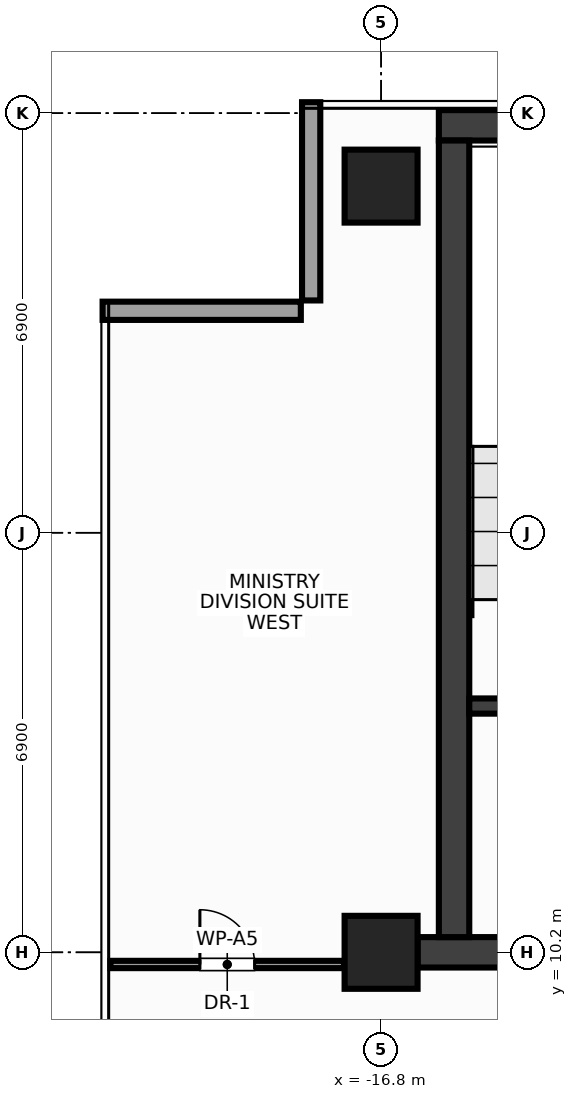
"""IFC4 building model, lengths in metres.
Left out: names, types, materials, properties, quantities, classifications, styles, units other than length and angle.
Written with IfcOpenShell. Run it as: python <this file> out.ifc"""

import sys

from ifc_helpers import new_model, si_unit, direction, frame, frame_2d, origin, origin_2d, place, context, subcontext, project, spatial, rectangle, extrude, source, transform, mapped, element, fill, save


model = new_model("IFC4")
c1 = context("Model", 3, precision=1e-05, world=origin(), true_north=direction((0.0, 1.0)))
c2 = subcontext(c1, "Body", "Model", "MODEL_VIEW")
j1 = project(units=[si_unit("LENGTHUNIT", "METRE"), si_unit("PLANEANGLEUNIT", "RADIAN")], contexts=[c1])
p1 = place(None, origin())
s1 = spatial("IfcSite", under=j1, at=p1, CompositionType="ELEMENT")
p2 = place(p1, origin())
s2 = spatial("IfcBuilding", under=s1, at=p2, CompositionType="ELEMENT")
p3 = place(p2, frame((0.0, 0.0, 275.6)))
s3 = spatial("IfcBuildingStorey", under=s2, at=p3, CompositionType="ELEMENT", Elevation=275.6)
m1 = source(origin(), c2, "Body", "SweptSolid", [
    extrude(rectangle(XDim=31.7, YDim=0.5, at=frame_2d((15.85, 0.0))), origin(), (0.0, 0.0, 1.0), 3.6),
])
p4 = place(p3, frame((-15.85, 23.8, 0.0), z_axis=(0.0, 0.0, 1.0), x_axis=(1.0, 0.0, 0.0)))
e1 = element("IfcWall", 1, at=p4, inside=s3, PredefinedType="SHEAR", context=c2, shape_type="MappedRepresentation", body=[
    mapped(m1, transform((0.0, 0.0, 0.0), x_axis=(1.0, 0.0, 0.0), y_axis=(0.0, 1.0, 0.0), z_axis=(0.0, 0.0, 1.0), scale=1.0)),
])
m2 = source(origin(), c2, "Body", "SweptSolid", [
    extrude(rectangle(XDim=32.4, YDim=0.5, at=frame_2d((16.2, 0.0))), origin(), (0.0, 0.0, 1.0), 3.6),
])
p5 = place(p3, frame((-16.2, 10.2, 0.0), z_axis=(0.0, 0.0, 1.0), x_axis=(1.0, 0.0, 0.0)))
e2 = element("IfcWall", 2, at=p5, inside=s3, PredefinedType="SHEAR", context=c2, shape_type="MappedRepresentation", body=[
    mapped(m2, transform((0.0, 0.0, 0.0), x_axis=(1.0, 0.0, 0.0), y_axis=(0.0, 1.0, 0.0), z_axis=(0.0, 0.0, 1.0), scale=1.0)),
])
p6 = place(p5, frame((2.05, 0.0, 0.0)))
e3 = element("IfcOpeningElement", 3, at=p6, cuts=e2, PredefinedType="OPENING", context=c2, shape_type="SweptSolid", body=[
    extrude(rectangle(XDim=1.6, YDim=2.15, at=frame_2d((0.8, 1.075))), frame((0.0, 0.262, 0.0), z_axis=(0.0, -1.0, 0.0), x_axis=(1.0, 0.0, 0.0)), (0.0, 0.0, 1.0), 0.524),
])
p7 = place(p5, frame((28.75, 0.0, 0.0)))
e4 = element("IfcOpeningElement", 4, at=p7, cuts=e2, PredefinedType="OPENING", context=c2, shape_type="SweptSolid", body=[
    extrude(rectangle(XDim=1.6, YDim=2.15, at=frame_2d((0.8, 1.075))), frame((0.0, 0.262, 0.0), z_axis=(0.0, -1.0, 0.0), x_axis=(1.0, 0.0, 0.0)), (0.0, 0.0, 1.0), 0.524),
])
p8 = place(p5, frame((15.45, 0.0, 0.0)))
e5 = element("IfcOpeningElement", 5, at=p8, cuts=e2, PredefinedType="OPENING", context=c2, shape_type="SweptSolid", body=[
    extrude(rectangle(XDim=1.5, YDim=2.2, at=frame_2d((0.75, 1.1))), frame((0.0, 0.262, 0.0), z_axis=(0.0, -1.0, 0.0), x_axis=(1.0, 0.0, 0.0)), (0.0, 0.0, 1.0), 0.524),
])
m3 = source(origin(), c2, "Body", "SweptSolid", [
    extrude(rectangle(XDim=13.1, YDim=0.5, at=frame_2d((6.55, 0.0))), origin(), (0.0, 0.0, 1.0), 3.6),
])
p9 = place(p3, frame((-15.6, 10.45, 0.0), z_axis=(0.0, 0.0, 1.0), x_axis=(0.0, 1.0, 0.0)))
e6 = element("IfcWall", 6, at=p9, inside=s3, PredefinedType="SHEAR", context=c2, shape_type="MappedRepresentation", body=[
    mapped(m3, transform((0.0, 0.0, 0.0), x_axis=(1.0, 0.0, 0.0), y_axis=(0.0, 1.0, 0.0), z_axis=(0.0, 0.0, 1.0), scale=1.0)),
])
m4 = source(origin(), c2, "Body", "SweptSolid", [
    extrude(rectangle(XDim=3.705, YDim=0.25, at=frame_2d((1.853, 0.0))), origin(), (0.0, 0.0, 1.0), 3.6),
])
p10 = place(p3, frame((-15.35, 14.25, 0.0), z_axis=(0.0, 0.0, 1.0), x_axis=(1.0, 0.0, 0.0)))
e7 = element("IfcWall", 7, at=p10, inside=s3, PredefinedType="SHEAR", context=c2, shape_type="MappedRepresentation", body=[
    mapped(m4, transform((0.0, 0.0, 0.0), x_axis=(1.0, 0.0, 0.0), y_axis=(0.0, 1.0, 0.0), z_axis=(0.0, 0.0, 1.0), scale=1.0)),
])
p11 = place(p10, frame((0.95, 0.0, 0.0)))
e8 = element("IfcOpeningElement", 8, at=p11, cuts=e7, PredefinedType="OPENING", context=c2, shape_type="SweptSolid", body=[
    extrude(rectangle(XDim=1.6, YDim=2.15, at=frame_2d((0.8, 1.075))), frame((0.0, 0.137, 0.0), z_axis=(0.0, -1.0, 0.0), x_axis=(1.0, 0.0, 0.0)), (0.0, 0.0, 1.0), 0.274),
])
m5 = source(origin(), c2, "Body", "SweptSolid", [
    extrude(rectangle(XDim=1.2, YDim=1.2, at=origin_2d()), origin(), (0.0, 0.0, 1.0), 3.6),
])
for number, where, z_axis, x_axis in (
    (9, (-16.8, 10.2, 0.0), (0.0, 0.0, 1.0), (1.0, 0.0, 0.0)),
    (10, (-16.8, 22.8, 0.0), (0.0, 0.0, 1.0), (1.0, 0.0, 0.0)),
):
    element("IfcColumn", number, at=place(p3, frame(where, z_axis=z_axis, x_axis=x_axis)), inside=s3, PredefinedType="COLUMN", context=c2, shape_type="MappedRepresentation", body=[
        mapped(m5, transform((0.0, 0.0, 0.0), x_axis=(1.0, 0.0, 0.0), y_axis=(0.0, 1.0, 0.0), z_axis=(0.0, 0.0, 1.0), scale=1.0)),
    ])
m6 = source(origin(), c2, "Body", "SweptSolid", [
    extrude(rectangle(XDim=3.26, YDim=0.3, at=frame_2d((1.63, 0.0))), origin(), (0.0, 0.0, 1.0), 2.75),
])
p12 = place(p3, frame((-17.95, 24.18, 0.0), z_axis=(0.0, 0.0, 1.0), x_axis=(0.0, -1.0, 0.0)))
e11 = element("IfcWall", 11, at=p12, inside=s3, PredefinedType="STANDARD", context=c2, shape_type="MappedRepresentation", body=[
    mapped(m6, transform((0.0, 0.0, 0.0), x_axis=(1.0, 0.0, 0.0), y_axis=(0.0, 1.0, 0.0), z_axis=(0.0, 0.0, 1.0), scale=1.0)),
])
m7 = source(origin(), c2, "Body", "SweptSolid", [
    extrude(rectangle(XDim=3.26, YDim=0.3, at=frame_2d((1.63, 0.0))), origin(), (0.0, 0.0, 1.0), 2.75),
])
p13 = place(p3, frame((-18.12, 20.75, 0.0), z_axis=(0.0, 0.0, 1.0), x_axis=(-1.0, 0.0, 0.0)))
e12 = element("IfcWall", 12, at=p13, inside=s3, PredefinedType="STANDARD", context=c2, shape_type="MappedRepresentation", body=[
    mapped(m7, transform((0.0, 0.0, 0.0), x_axis=(1.0, 0.0, 0.0), y_axis=(0.0, 1.0, 0.0), z_axis=(0.0, 0.0, 1.0), scale=1.0)),
])
m8 = source(origin(), c2, "Body", "SweptSolid", [
    extrude(rectangle(XDim=3.84, YDim=0.12, at=frame_2d((1.92, 0.0))), origin(), (0.0, 0.0, 1.0), 2.805),
])
p14 = place(p3, frame((-21.25, 10.0, 0.0), z_axis=(0.0, 0.0, 1.0), x_axis=(1.0, 0.0, 0.0)))
e13 = element("IfcWall", 13, at=p14, inside=s3, PredefinedType="PARTITIONING", context=c2, shape_type="MappedRepresentation", body=[
    mapped(m8, transform((0.0, 0.0, 0.0), x_axis=(1.0, 0.0, 0.0), y_axis=(0.0, 1.0, 0.0), z_axis=(0.0, 0.0, 1.0), scale=1.0)),
])
p15 = place(p14, frame((1.47, 0.0, 0.0)))
e14 = element("IfcOpeningElement", 14, at=p15, cuts=e13, PredefinedType="OPENING", context=c2, shape_type="SweptSolid", body=[
    extrude(rectangle(XDim=0.9, YDim=2.15, at=frame_2d((0.45, 1.075))), frame((0.0, 0.072, 0.0), z_axis=(0.0, -1.0, 0.0), x_axis=(1.0, 0.0, 0.0)), (0.0, 0.0, 1.0), 0.144),
])
m9 = source(origin(), c2, "Body", "SweptSolid", [
    extrude(rectangle(XDim=0.9, YDim=2.15, at=frame_2d((0.45, 1.075))), frame((0.0, 0.025, 0.0), z_axis=(0.0, -1.0, 0.0), x_axis=(1.0, 0.0, 0.0)), (0.0, 0.0, 1.0), 0.05),
])
p16 = place(p15, origin())
e15 = element("IfcDoor", 15, at=p16, inside=s3, OperationType="SINGLE_SWING_LEFT", PredefinedType="DOOR", context=c2, shape_type="MappedRepresentation", body=[
    mapped(m9, transform((0.0, 0.0, 0.0), x_axis=(1.0, 0.0, 0.0), y_axis=(0.0, 1.0, 0.0), z_axis=(0.0, 0.0, 1.0), scale=1.0)),
])
fill(e14, e15)
save(model, sys.argv[1])
